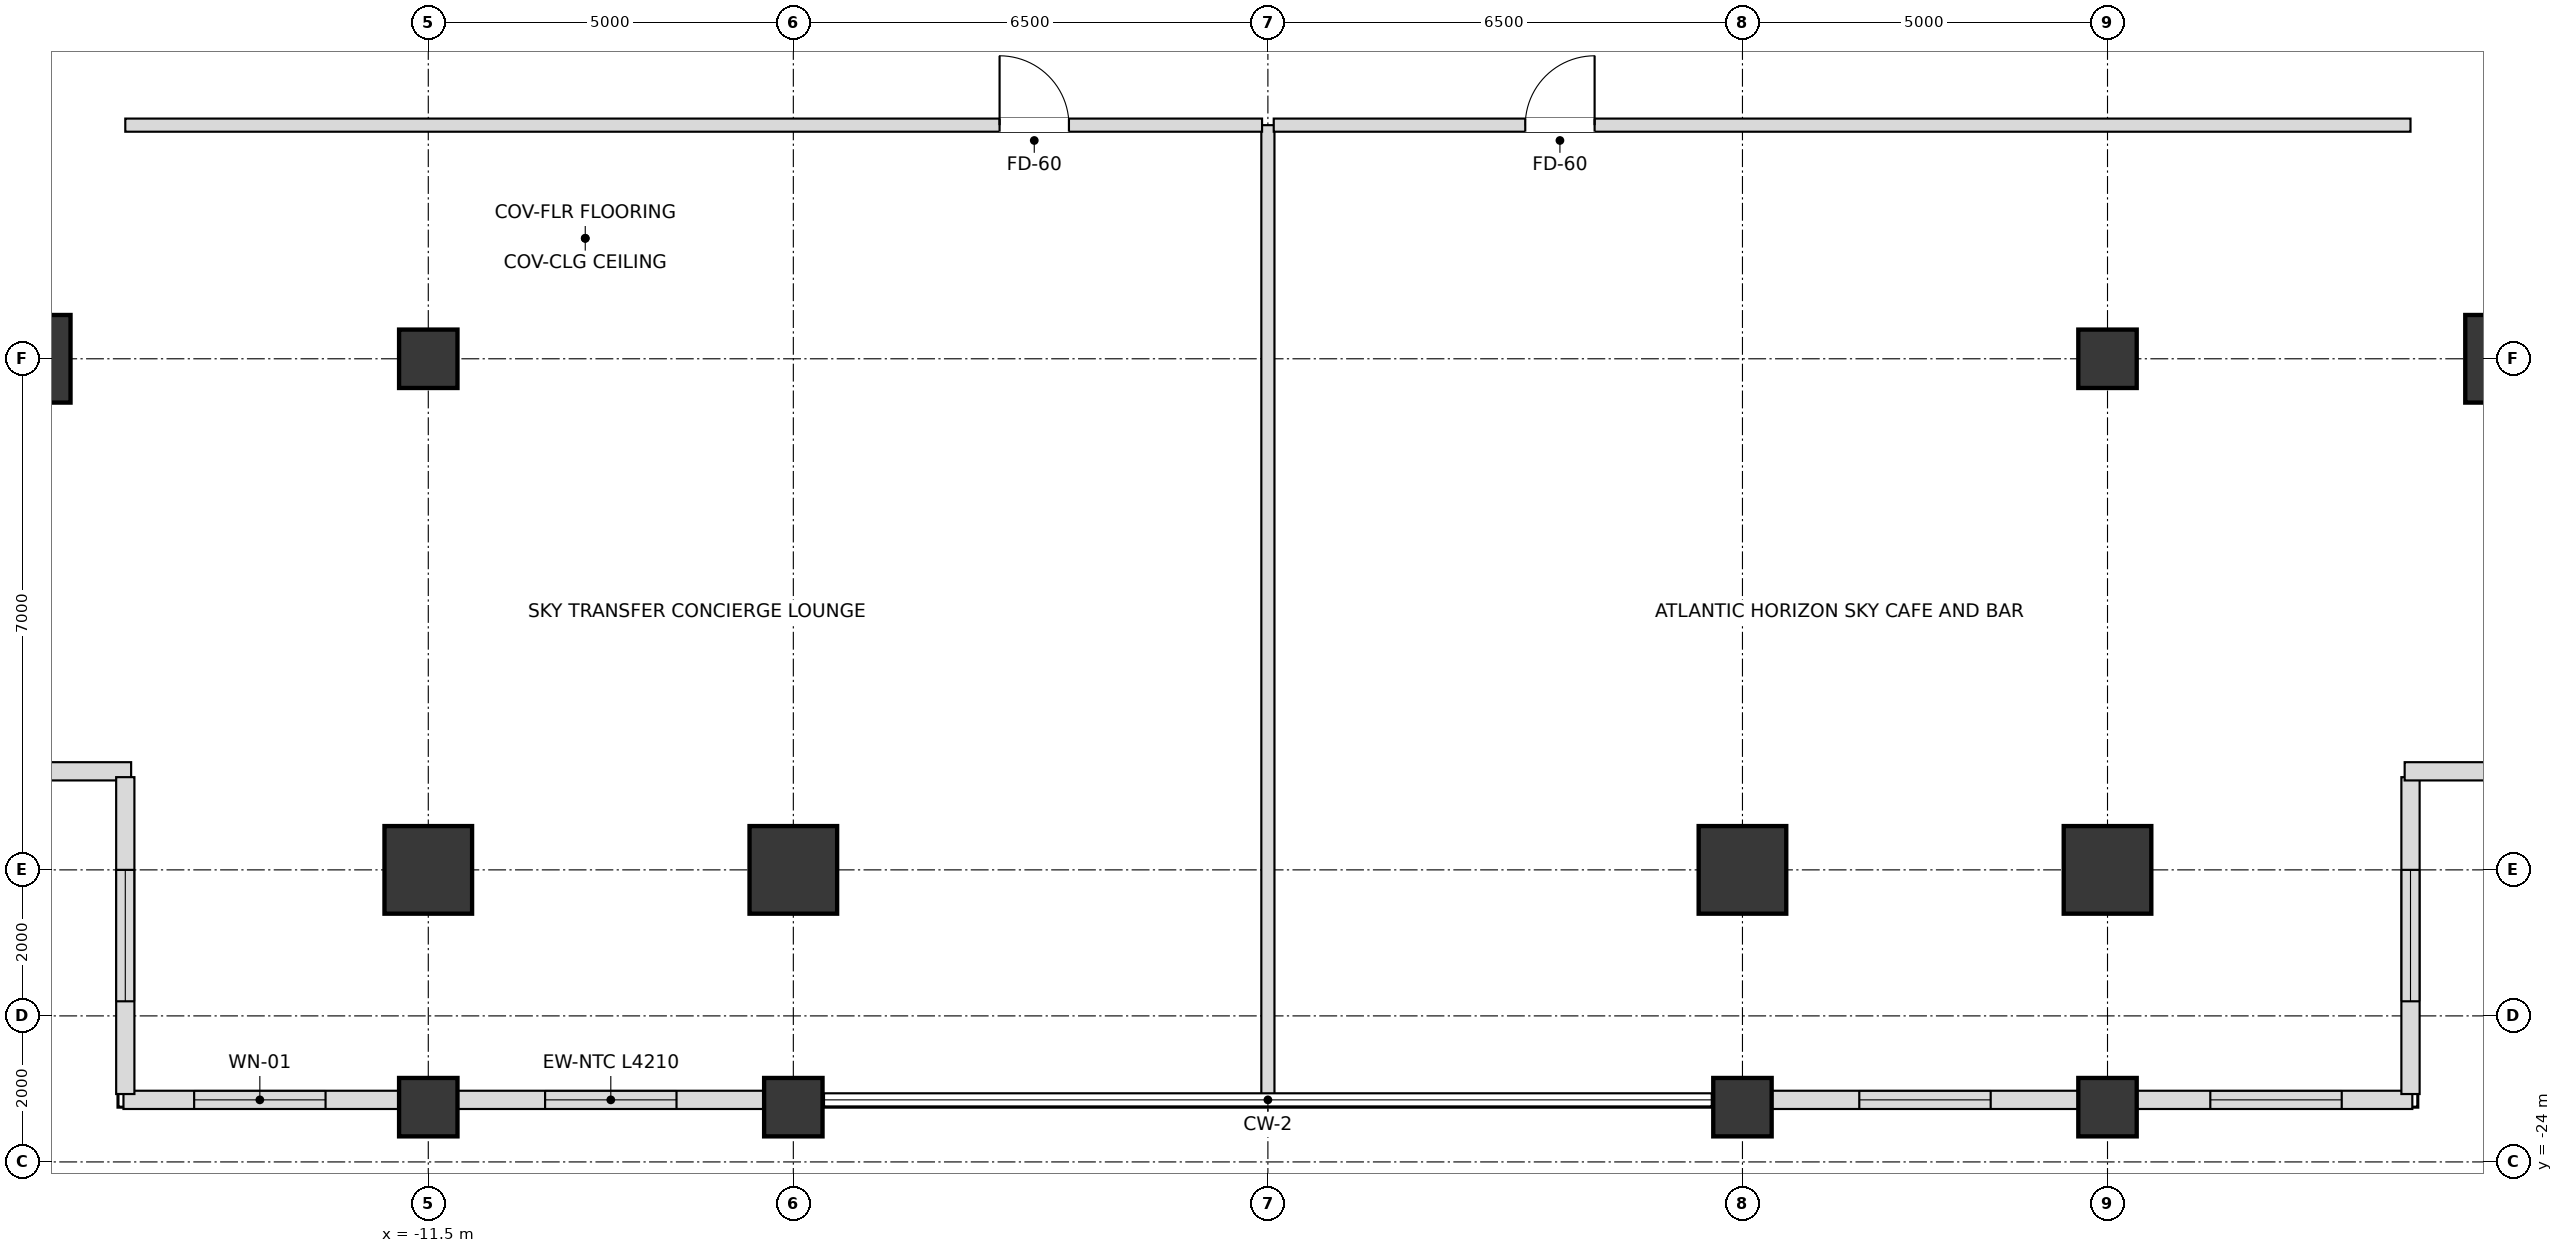
"""IFC4 building model, lengths in metres.
Left out: names, types, materials, properties, quantities, classifications, styles, units other than length and angle.
Written with IfcOpenShell. Run it as: python <this file> out.ifc"""

import sys

from ifc_helpers import new_model, si_unit, direction, frame, frame_2d, origin, origin_2d, place, context, subcontext, project, spatial, rectangle, extrude, element, fill, save


model = new_model("IFC4")
c1 = context("Model", 3, precision=1e-05, world=origin(), true_north=direction((0.0, 1.0)))
c2 = subcontext(c1, "Body", "Model", "MODEL_VIEW")
j1 = project(units=[si_unit("LENGTHUNIT", "METRE"), si_unit("PLANEANGLEUNIT", "RADIAN")], contexts=[c1])
p1 = place(None, origin())
s1 = spatial("IfcSite", under=j1, at=p1, CompositionType="ELEMENT")
p2 = place(p1, origin())
s2 = spatial("IfcBuilding", under=s1, at=p2, CompositionType="ELEMENT")
p3 = place(p2, frame((0.0, 0.0, 125.1)))
s3 = spatial("IfcBuildingStorey", under=s2, at=p3, CompositionType="ELEMENT", Elevation=125.1)
for number, where, z_axis, x_axis in (
    (1, (-11.5, -20.0, 0.0), (0.0, 0.0, 1.0), (1.0, 0.0, 0.0)),
    (2, (-6.5, -20.0, 0.0), (0.0, 0.0, 1.0), (1.0, 0.0, 0.0)),
    (3, (6.5, -20.0, 0.0), (0.0, 0.0, 1.0), (1.0, 0.0, 0.0)),
    (4, (11.5, -20.0, 0.0), (0.0, 0.0, 1.0), (1.0, 0.0, 0.0)),
    (5, (17.0, -13.0, 0.0), (0.0, 0.0, 1.0), (1.0, 0.0, 0.0)),
    (6, (-17.0, -13.0, 0.0), (0.0, 0.0, 1.0), (1.0, 0.0, 0.0)),
):
    element("IfcColumn", number, at=place(p3, frame(where, z_axis=z_axis, x_axis=x_axis)), inside=s3, PredefinedType="USERDEFINED", context=c2, shape_type="SweptSolid", body=[
        extrude(rectangle(XDim=1.2, YDim=1.2, at=origin_2d()), origin(), (0.0, 0.0, 1.0), 4.5),
    ])
for number, where, z_axis, x_axis in (
    (7, (-11.5, -13.0, 0.0), (0.0, 0.0, 1.0), (1.0, 0.0, 0.0)),
    (8, (11.5, -13.0, 0.0), (0.0, 0.0, 1.0), (1.0, 0.0, 0.0)),
    (9, (-11.5, -23.25, 0.0), (0.0, 0.0, 1.0), (1.0, 0.0, 0.0)),
    (10, (-6.5, -23.25, 0.0), (0.0, 0.0, 1.0), (1.0, 0.0, 0.0)),
    (11, (6.5, -23.25, 0.0), (0.0, 0.0, 1.0), (1.0, 0.0, 0.0)),
    (12, (11.5, -23.25, 0.0), (0.0, 0.0, 1.0), (1.0, 0.0, 0.0)),
):
    element("IfcColumn", number, at=place(p3, frame(where, z_axis=z_axis, x_axis=x_axis)), inside=s3, PredefinedType="COLUMN", context=c2, shape_type="SweptSolid", body=[
        extrude(rectangle(XDim=0.8, YDim=0.8, at=origin_2d()), origin(), (0.0, 0.0, 1.0), 4.5),
    ])
p4 = place(p3, frame((-15.675, -23.15, 0.0), z_axis=(0.0, 0.0, 1.0), x_axis=(1.0, 0.0, 0.0)))
e13 = element("IfcWall", 13, at=p4, inside=s3, PredefinedType="SOLIDWALL", context=c2, shape_type="SweptSolid", body=[
    extrude(rectangle(XDim=3.78, YDim=0.25, at=frame_2d((1.89, 0.0))), origin(), (0.0, 0.0, 1.0), 3.636),
])
p5 = place(p4, frame((0.968, 0.0, 0.72)))
e14 = element("IfcOpeningElement", 14, at=p5, cuts=e13, PredefinedType="OPENING", context=c2, shape_type="SweptSolid", body=[
    extrude(rectangle(XDim=1.8, YDim=1.68, at=frame_2d((0.9, 0.84))), frame((0.0, 0.135, 0.0), z_axis=(0.0, -1.0, 0.0), x_axis=(1.0, 0.0, 0.0)), (0.0, 0.0, 1.0), 0.27),
])
p6 = place(p3, frame((-11.105, -23.15, 0.0), z_axis=(0.0, 0.0, 1.0), x_axis=(1.0, 0.0, 0.0)))
e15 = element("IfcWall", 15, at=p6, inside=s3, PredefinedType="SOLIDWALL", context=c2, shape_type="SweptSolid", body=[
    extrude(rectangle(XDim=4.21, YDim=0.25, at=frame_2d((2.105, 0.0))), origin(), (0.0, 0.0, 1.0), 3.636),
])
p7 = place(p6, frame((1.205, 0.0, 0.72)))
e16 = element("IfcOpeningElement", 16, at=p7, cuts=e15, PredefinedType="OPENING", context=c2, shape_type="SweptSolid", body=[
    extrude(rectangle(XDim=1.8, YDim=1.68, at=frame_2d((0.9, 0.84))), frame((0.0, 0.135, 0.0), z_axis=(0.0, -1.0, 0.0), x_axis=(1.0, 0.0, 0.0)), (0.0, 0.0, 1.0), 0.27),
])
p8 = place(p3, frame((6.895, -23.15, 0.0), z_axis=(0.0, 0.0, 1.0), x_axis=(1.0, 0.0, 0.0)))
e17 = element("IfcWall", 17, at=p8, inside=s3, PredefinedType="SOLIDWALL", context=c2, shape_type="SweptSolid", body=[
    extrude(rectangle(XDim=4.21, YDim=0.25, at=frame_2d((2.105, 0.0))), origin(), (0.0, 0.0, 1.0), 3.636),
])
p9 = place(p8, frame((1.205, 0.0, 0.72)))
e18 = element("IfcOpeningElement", 18, at=p9, cuts=e17, PredefinedType="OPENING", context=c2, shape_type="SweptSolid", body=[
    extrude(rectangle(XDim=1.8, YDim=1.68, at=frame_2d((0.9, 0.84))), frame((0.0, 0.135, 0.0), z_axis=(0.0, -1.0, 0.0), x_axis=(1.0, 0.0, 0.0)), (0.0, 0.0, 1.0), 0.27),
])
p10 = place(p3, frame((11.895, -23.15, 0.0), z_axis=(0.0, 0.0, 1.0), x_axis=(1.0, 0.0, 0.0)))
e19 = element("IfcWall", 19, at=p10, inside=s3, PredefinedType="SOLIDWALL", context=c2, shape_type="SweptSolid", body=[
    extrude(rectangle(XDim=3.78, YDim=0.25, at=frame_2d((1.89, 0.0))), origin(), (0.0, 0.0, 1.0), 3.636),
])
p11 = place(p10, frame((1.013, 0.0, 0.72)))
e20 = element("IfcOpeningElement", 20, at=p11, cuts=e19, PredefinedType="OPENING", context=c2, shape_type="SweptSolid", body=[
    extrude(rectangle(XDim=1.8, YDim=1.68, at=frame_2d((0.9, 0.84))), frame((0.0, 0.135, 0.0), z_axis=(0.0, -1.0, 0.0), x_axis=(1.0, 0.0, 0.0)), (0.0, 0.0, 1.0), 0.27),
])
p12 = place(p3, frame((-20.23, -18.65, 0.0), z_axis=(0.0, 0.0, 1.0), x_axis=(1.0, 0.0, 0.0)))
e21 = element("IfcWall", 21, at=p12, inside=s3, PredefinedType="SOLIDWALL", context=c2, shape_type="SweptSolid", body=[
    extrude(rectangle(XDim=4.66, YDim=0.25, at=frame_2d((2.33, 0.0))), origin(), (0.0, 0.0, 1.0), 3.636),
])
p13 = place(p12, frame((1.43, 0.0, 0.72)))
e22 = element("IfcOpeningElement", 22, at=p13, cuts=e21, PredefinedType="OPENING", context=c2, shape_type="SweptSolid", body=[
    extrude(rectangle(XDim=1.8, YDim=1.68, at=frame_2d((0.9, 0.84))), frame((0.0, 0.135, 0.0), z_axis=(0.0, -1.0, 0.0), x_axis=(1.0, 0.0, 0.0)), (0.0, 0.0, 1.0), 0.27),
])
p14 = place(p3, frame((-15.65, -18.73, 0.0), z_axis=(0.0, 0.0, 1.0), x_axis=(0.0, -1.0, 0.0)))
e23 = element("IfcWall", 23, at=p14, inside=s3, PredefinedType="SOLIDWALL", context=c2, shape_type="SweptSolid", body=[
    extrude(rectangle(XDim=4.34, YDim=0.25, at=frame_2d((2.17, 0.0))), origin(), (0.0, 0.0, 1.0), 3.636),
])
p15 = place(p14, frame((1.27, 0.0, 0.72)))
e24 = element("IfcOpeningElement", 24, at=p15, cuts=e23, PredefinedType="OPENING", context=c2, shape_type="SweptSolid", body=[
    extrude(rectangle(XDim=1.8, YDim=1.68, at=frame_2d((0.9, 0.84))), frame((0.0, 0.135, 0.0), z_axis=(0.0, -1.0, 0.0), x_axis=(1.0, 0.0, 0.0)), (0.0, 0.0, 1.0), 0.27),
])
p16 = place(p3, frame((15.65, -23.07, 0.0), z_axis=(0.0, 0.0, 1.0), x_axis=(0.0, 1.0, 0.0)))
e25 = element("IfcWall", 25, at=p16, inside=s3, PredefinedType="SOLIDWALL", context=c2, shape_type="SweptSolid", body=[
    extrude(rectangle(XDim=4.34, YDim=0.25, at=frame_2d((2.17, 0.0))), origin(), (0.0, 0.0, 1.0), 3.636),
])
p17 = place(p16, frame((1.27, 0.0, 0.72)))
e26 = element("IfcOpeningElement", 26, at=p17, cuts=e25, PredefinedType="OPENING", context=c2, shape_type="SweptSolid", body=[
    extrude(rectangle(XDim=1.8, YDim=1.68, at=frame_2d((0.9, 0.84))), frame((0.0, 0.135, 0.0), z_axis=(0.0, -1.0, 0.0), x_axis=(1.0, 0.0, 0.0)), (0.0, 0.0, 1.0), 0.27),
])
p18 = place(p3, frame((15.57, -18.65, 0.0), z_axis=(0.0, 0.0, 1.0), x_axis=(1.0, 0.0, 0.0)))
e27 = element("IfcWall", 27, at=p18, inside=s3, PredefinedType="SOLIDWALL", context=c2, shape_type="SweptSolid", body=[
    extrude(rectangle(XDim=4.66, YDim=0.25, at=frame_2d((2.33, 0.0))), origin(), (0.0, 0.0, 1.0), 3.636),
])
p19 = place(p18, frame((1.43, 0.0, 0.72)))
e28 = element("IfcOpeningElement", 28, at=p19, cuts=e27, PredefinedType="OPENING", context=c2, shape_type="SweptSolid", body=[
    extrude(rectangle(XDim=1.8, YDim=1.68, at=frame_2d((0.9, 0.84))), frame((0.0, 0.135, 0.0), z_axis=(0.0, -1.0, 0.0), x_axis=(1.0, 0.0, 0.0)), (0.0, 0.0, 1.0), 0.27),
])
p20 = place(p3, frame((0.0, -23.15, 0.0), z_axis=(0.0, 0.0, 1.0), x_axis=(0.0, 1.0, 0.0)))
e29 = element("IfcWall", 29, at=p20, inside=s3, PredefinedType="PARTITIONING", context=c2, shape_type="SweptSolid", body=[
    extrude(rectangle(XDim=13.35, YDim=0.18, at=frame_2d((6.675, 0.0))), origin(), (0.0, 0.0, 1.0), 3.716),
])
p21 = place(p3, frame((-15.65, -9.8, 0.0), z_axis=(0.0, 0.0, 1.0), x_axis=(1.0, 0.0, 0.0)))
e30 = element("IfcWall", 30, at=p21, inside=s3, PredefinedType="PARTITIONING", context=c2, shape_type="SweptSolid", body=[
    extrude(rectangle(XDim=15.57, YDim=0.18, at=frame_2d((7.785, 0.0))), origin(), (0.0, 0.0, 1.0), 3.716),
])
p22 = place(p21, frame((11.975, 0.0, 0.0)))
e31 = element("IfcOpeningElement", 31, at=p22, cuts=e30, PredefinedType="OPENING", context=c2, shape_type="SweptSolid", body=[
    extrude(rectangle(XDim=0.95, YDim=2.15, at=frame_2d((0.475, 1.075))), frame((0.0, 0.1, 0.0), z_axis=(0.0, -1.0, 0.0), x_axis=(1.0, 0.0, 0.0)), (0.0, 0.0, 1.0), 0.2),
])
p23 = place(p3, frame((0.08, -9.8, 0.0), z_axis=(0.0, 0.0, 1.0), x_axis=(1.0, 0.0, 0.0)))
e32 = element("IfcWall", 32, at=p23, inside=s3, PredefinedType="PARTITIONING", context=c2, shape_type="SweptSolid", body=[
    extrude(rectangle(XDim=15.57, YDim=0.18, at=frame_2d((7.785, 0.0))), origin(), (0.0, 0.0, 1.0), 3.716),
])
p24 = place(p23, frame((3.445, 0.0, 0.0)))
e33 = element("IfcOpeningElement", 33, at=p24, cuts=e32, PredefinedType="OPENING", context=c2, shape_type="SweptSolid", body=[
    extrude(rectangle(XDim=0.95, YDim=2.15, at=frame_2d((0.475, 1.075))), frame((0.0, 0.1, 0.0), z_axis=(0.0, -1.0, 0.0), x_axis=(1.0, 0.0, 0.0)), (0.0, 0.0, 1.0), 0.2),
])
p25 = place(p5, origin())
e34 = element("IfcWindow", 34, at=p25, inside=s3, PartitioningType="SINGLE_PANEL", PredefinedType="WINDOW", context=c2, shape_type="SweptSolid", body=[
    extrude(rectangle(XDim=1.8, YDim=1.68, at=frame_2d((0.9, 0.84))), frame((0.0, 0.03, 0.0), z_axis=(0.0, -1.0, 0.0), x_axis=(1.0, 0.0, 0.0)), (0.0, 0.0, 1.0), 0.06),
])
fill(e14, e34)
p26 = place(p7, origin())
e35 = element("IfcWindow", 35, at=p26, inside=s3, PartitioningType="SINGLE_PANEL", PredefinedType="WINDOW", context=c2, shape_type="SweptSolid", body=[
    extrude(rectangle(XDim=1.8, YDim=1.68, at=frame_2d((0.9, 0.84))), frame((0.0, 0.03, 0.0), z_axis=(0.0, -1.0, 0.0), x_axis=(1.0, 0.0, 0.0)), (0.0, 0.0, 1.0), 0.06),
])
fill(e16, e35)
p27 = place(p9, origin())
e36 = element("IfcWindow", 36, at=p27, inside=s3, PartitioningType="SINGLE_PANEL", PredefinedType="WINDOW", context=c2, shape_type="SweptSolid", body=[
    extrude(rectangle(XDim=1.8, YDim=1.68, at=frame_2d((0.9, 0.84))), frame((0.0, 0.03, 0.0), z_axis=(0.0, -1.0, 0.0), x_axis=(1.0, 0.0, 0.0)), (0.0, 0.0, 1.0), 0.06),
])
fill(e18, e36)
p28 = place(p11, origin())
e37 = element("IfcWindow", 37, at=p28, inside=s3, PartitioningType="SINGLE_PANEL", PredefinedType="WINDOW", context=c2, shape_type="SweptSolid", body=[
    extrude(rectangle(XDim=1.8, YDim=1.68, at=frame_2d((0.9, 0.84))), frame((0.0, 0.03, 0.0), z_axis=(0.0, -1.0, 0.0), x_axis=(1.0, 0.0, 0.0)), (0.0, 0.0, 1.0), 0.06),
])
fill(e20, e37)
p29 = place(p15, origin())
e38 = element("IfcWindow", 38, at=p29, inside=s3, PartitioningType="SINGLE_PANEL", PredefinedType="WINDOW", context=c2, shape_type="SweptSolid", body=[
    extrude(rectangle(XDim=1.8, YDim=1.68, at=frame_2d((0.9, 0.84))), frame((0.0, 0.03, 0.0), z_axis=(0.0, -1.0, 0.0), x_axis=(1.0, 0.0, 0.0)), (0.0, 0.0, 1.0), 0.06),
])
fill(e24, e38)
p30 = place(p17, origin())
e39 = element("IfcWindow", 39, at=p30, inside=s3, PartitioningType="SINGLE_PANEL", PredefinedType="WINDOW", context=c2, shape_type="SweptSolid", body=[
    extrude(rectangle(XDim=1.8, YDim=1.68, at=frame_2d((0.9, 0.84))), frame((0.0, 0.03, 0.0), z_axis=(0.0, -1.0, 0.0), x_axis=(1.0, 0.0, 0.0)), (0.0, 0.0, 1.0), 0.06),
])
fill(e26, e39)
p31 = place(p22, origin())
e40 = element("IfcDoor", 40, at=p31, inside=s3, OperationType="SINGLE_SWING_LEFT", PredefinedType="DOOR", context=c2, shape_type="SweptSolid", body=[
    extrude(rectangle(XDim=0.95, YDim=2.15, at=frame_2d((0.475, 1.075))), frame((0.0, 0.025, 0.0), z_axis=(0.0, -1.0, 0.0), x_axis=(1.0, 0.0, 0.0)), (0.0, 0.0, 1.0), 0.05),
])
fill(e31, e40)
p32 = place(p24, origin())
e41 = element("IfcDoor", 41, at=p32, inside=s3, OperationType="SINGLE_SWING_RIGHT", PredefinedType="DOOR", context=c2, shape_type="SweptSolid", body=[
    extrude(rectangle(XDim=0.95, YDim=2.15, at=frame_2d((0.475, 1.075))), frame((0.0, 0.025, 0.0), z_axis=(0.0, -1.0, 0.0), x_axis=(1.0, 0.0, 0.0)), (0.0, 0.0, 1.0), 0.05),
])
fill(e33, e41)
save(model, sys.argv[1])
